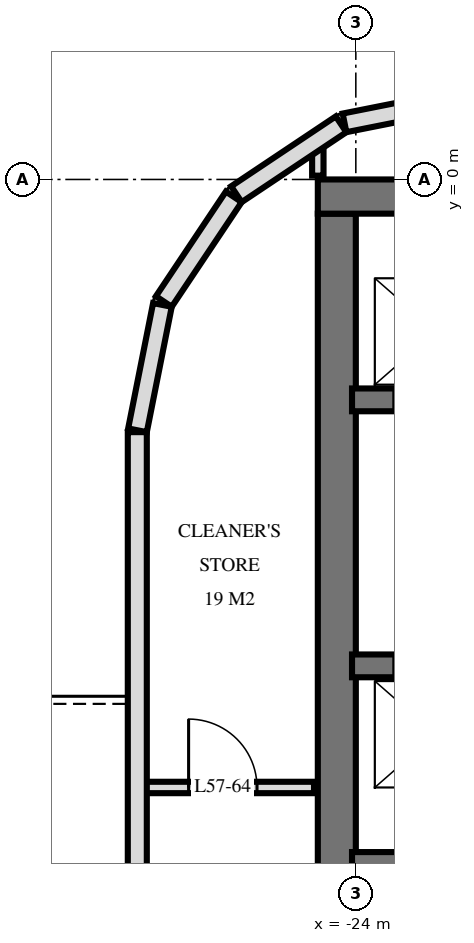
"""IFC4 building model, lengths in metres.
Left out: names, types, materials, properties, quantities, classifications, styles, units other than length and angle.
Written with IfcOpenShell. Run it as: python <this file> out.ifc"""

import sys

from ifc_helpers import new_model, si_unit, direction, frame, frame_2d, origin, place, context, subcontext, project, spatial, rectangle, extrude, element, fill, save


model = new_model("IFC4")
c1 = context("Model", 3, precision=1e-05, world=origin(), true_north=direction((0.0, 1.0)))
c2 = subcontext(c1, "Body", "Model", "MODEL_VIEW")
j1 = project(units=[si_unit("LENGTHUNIT", "METRE"), si_unit("PLANEANGLEUNIT", "RADIAN")], contexts=[c1])
p1 = place(None, origin())
s1 = spatial("IfcSite", under=j1, at=p1, CompositionType="ELEMENT")
p2 = place(p1, origin())
s2 = spatial("IfcBuilding", under=s1, at=p2, CompositionType="ELEMENT")
p3 = place(p2, frame((0.0, 0.0, 218.6)))
s3 = spatial("IfcBuildingStorey", under=s2, at=p3, CompositionType="ELEMENT", Elevation=218.6)
p4 = place(p3, frame((-24.5, -0.225, 0.0), z_axis=(0.0, 0.0, 1.0), x_axis=(1.0, 0.0, 0.0)))
e1 = element("IfcWall", 1, at=p4, inside=s3, PredefinedType="SHEAR", context=c2, shape_type="SweptSolid", body=[
    extrude(rectangle(XDim=14.5, YDim=0.45, at=frame_2d((7.25, 0.0))), origin(), (0.0, 0.0, 1.0), 3.5),
])
p5 = place(p3, frame((-24.25, -14.55, 0.0), z_axis=(0.0, 0.0, 1.0), x_axis=(0.0, 1.0, 0.0)))
e2 = element("IfcWall", 2, at=p5, inside=s3, PredefinedType="SHEAR", context=c2, shape_type="SweptSolid", body=[
    extrude(rectangle(XDim=14.1, YDim=0.5, at=frame_2d((7.05, 0.0))), origin(), (0.0, 0.0, 1.0), 3.5),
])
p6 = place(p3, frame((-24.05, -2.9, 0.0), z_axis=(0.0, 0.0, 1.0), x_axis=(1.0, 0.0, 0.0)))
e3 = element("IfcWall", 3, at=p6, inside=s3, PredefinedType="SHEAR", context=c2, shape_type="SweptSolid", body=[
    extrude(rectangle(XDim=13.7, YDim=0.3, at=frame_2d((6.85, 0.0))), origin(), (0.0, 0.0, 1.0), 3.5),
])
p7 = place(p6, frame((0.55, 0.0, 0.0)))
e4 = element("IfcOpeningElement", 4, at=p7, cuts=e3, PredefinedType="OPENING", context=c2, shape_type="SweptSolid", body=[
    extrude(rectangle(XDim=1.1, YDim=2.1, at=frame_2d((0.55, 1.05))), frame((0.0, 0.16, 0.0), z_axis=(0.0, -1.0, 0.0), x_axis=(1.0, 0.0, 0.0)), (0.0, 0.0, 1.0), 0.32),
])
p8 = place(p6, frame((5.9, 0.0, 0.0)))
e5 = element("IfcOpeningElement", 5, at=p8, cuts=e3, PredefinedType="OPENING", context=c2, shape_type="SweptSolid", body=[
    extrude(rectangle(XDim=0.9, YDim=2.1, at=frame_2d((0.45, 1.05))), frame((0.0, 0.16, 0.0), z_axis=(0.0, -1.0, 0.0), x_axis=(1.0, 0.0, 0.0)), (0.0, 0.0, 1.0), 0.32),
])
p9 = place(p6, frame((11.85, 0.0, 0.0)))
e6 = element("IfcOpeningElement", 6, at=p9, cuts=e3, PredefinedType="OPENING", context=c2, shape_type="SweptSolid", body=[
    extrude(rectangle(XDim=1.0, YDim=2.1, at=frame_2d((0.5, 1.05))), frame((0.0, 0.16, 0.0), z_axis=(0.0, -1.0, 0.0), x_axis=(1.0, 0.0, 0.0)), (0.0, 0.0, 1.0), 0.32),
])
p10 = place(p6, frame((9.312, 0.0, 0.0)))
e7 = element("IfcOpeningElement", 7, at=p10, cuts=e3, PredefinedType="OPENING", context=c2, shape_type="SweptSolid", body=[
    extrude(rectangle(XDim=1.0, YDim=2.1, at=frame_2d((0.5, 1.05))), frame((0.0, 0.16, 0.0), z_axis=(0.0, -1.0, 0.0), x_axis=(1.0, 0.0, 0.0)), (0.0, 0.0, 1.0), 0.32),
])
p11 = place(p6, frame((7.887, 0.0, 0.0)))
e8 = element("IfcOpeningElement", 8, at=p11, cuts=e3, PredefinedType="OPENING", context=c2, shape_type="SweptSolid", body=[
    extrude(rectangle(XDim=1.0, YDim=2.1, at=frame_2d((0.5, 1.05))), frame((0.0, 0.16, 0.0), z_axis=(0.0, -1.0, 0.0), x_axis=(1.0, 0.0, 0.0)), (0.0, 0.0, 1.0), 0.32),
])
p12 = place(p6, frame((3.0, 0.0, 0.0)))
e9 = element("IfcOpeningElement", 9, at=p12, cuts=e3, PredefinedType="OPENING", context=c2, shape_type="SweptSolid", body=[
    extrude(rectangle(XDim=1.0, YDim=2.1, at=frame_2d((0.5, 1.05))), frame((0.0, 0.16, 0.0), z_axis=(0.0, -1.0, 0.0), x_axis=(1.0, 0.0, 0.0)), (0.0, 0.0, 1.0), 0.32),
])
p13 = place(p3, frame((-24.05, -6.4, 0.0), z_axis=(0.0, 0.0, 1.0), x_axis=(1.0, 0.0, 0.0)))
e10 = element("IfcWall", 10, at=p13, inside=s3, PredefinedType="SHEAR", context=c2, shape_type="SweptSolid", body=[
    extrude(rectangle(XDim=13.7, YDim=0.3, at=frame_2d((6.85, 0.0))), origin(), (0.0, 0.0, 1.0), 3.5),
])
p14 = place(p13, frame((0.55, 0.0, 0.0)))
e11 = element("IfcOpeningElement", 11, at=p14, cuts=e10, PredefinedType="OPENING", context=c2, shape_type="SweptSolid", body=[
    extrude(rectangle(XDim=1.1, YDim=2.1, at=frame_2d((0.55, 1.05))), frame((0.0, 0.16, 0.0), z_axis=(0.0, -1.0, 0.0), x_axis=(1.0, 0.0, 0.0)), (0.0, 0.0, 1.0), 0.32),
])
p15 = place(p13, frame((5.8, 0.0, 0.0)))
e12 = element("IfcOpeningElement", 12, at=p15, cuts=e10, PredefinedType="OPENING", context=c2, shape_type="SweptSolid", body=[
    extrude(rectangle(XDim=1.1, YDim=2.1, at=frame_2d((0.55, 1.05))), frame((0.0, 0.16, 0.0), z_axis=(0.0, -1.0, 0.0), x_axis=(1.0, 0.0, 0.0)), (0.0, 0.0, 1.0), 0.32),
])
p16 = place(p3, frame((-24.05, -9.0, 0.0), z_axis=(0.0, 0.0, 1.0), x_axis=(1.0, 0.0, 0.0)))
e13 = element("IfcWall", 13, at=p16, inside=s3, PredefinedType="SHEAR", context=c2, shape_type="SweptSolid", body=[
    extrude(rectangle(XDim=13.7, YDim=0.3, at=frame_2d((6.85, 0.0))), origin(), (0.0, 0.0, 1.0), 3.5),
])
p17 = place(p16, frame((8.8, 0.0, 0.0)))
e14 = element("IfcOpeningElement", 14, at=p17, cuts=e13, PredefinedType="OPENING", context=c2, shape_type="SweptSolid", body=[
    extrude(rectangle(XDim=1.1, YDim=2.1, at=frame_2d((0.55, 1.05))), frame((0.0, 0.16, 0.0), z_axis=(0.0, -1.0, 0.0), x_axis=(1.0, 0.0, 0.0)), (0.0, 0.0, 1.0), 0.32),
])
p18 = place(p3, frame((-22.5, 1.073, 0.0), z_axis=(0.0, 0.0, 1.0), x_axis=(-0.980803419081, -0.194999110559, 0.0)))
e15 = element("IfcWall", 15, at=p18, inside=s3, PredefinedType="SOLIDWALL", context=c2, shape_type="SweptSolid", body=[
    extrude(rectangle(XDim=1.681, YDim=0.25, at=frame_2d((0.841, 0.0))), origin(), (0.0, 0.0, 1.0), 3.22),
])
for number, where, z_axis, x_axis in (
    (16, (-24.194, 0.726, 0.0), (0.0, 0.0, 1.0), (-0.831, -0.556, 0.0)),
    (17, (-25.606, -0.229, 0.0), (0.0, 0.0, 1.0), (-0.556, -0.831, 0.0)),
):
    element("IfcWall", number, at=place(p3, frame(where, z_axis=z_axis, x_axis=x_axis)), inside=s3, PredefinedType="SOLIDWALL", context=c2, shape_type="SweptSolid", body=[
        extrude(rectangle(XDim=1.656, YDim=0.25, at=frame_2d((0.828, 0.0))), origin(), (0.0, 0.0, 1.0), 3.22),
    ])
p19 = place(p3, frame((-26.545, -1.651, 0.0), z_axis=(0.0, 0.0, 1.0), x_axis=(-0.194999110559, -0.980803419081, 0.0)))
e18 = element("IfcWall", 18, at=p19, inside=s3, PredefinedType="SOLIDWALL", context=c2, shape_type="SweptSolid", body=[
    extrude(rectangle(XDim=1.681, YDim=0.25, at=frame_2d((0.841, 0.0))), origin(), (0.0, 0.0, 1.0), 3.22),
])
p20 = place(p3, frame((-26.875, -3.325, 0.0), z_axis=(0.0, 0.0, 1.0), x_axis=(0.0, -1.0, 0.0)))
e19 = element("IfcWall", 19, at=p20, inside=s3, PredefinedType="SOLIDWALL", context=c2, shape_type="SweptSolid", body=[
    extrude(rectangle(XDim=21.551, YDim=0.25, at=frame_2d((10.775, 0.0))), origin(), (0.0, 0.0, 1.0), 3.22),
])
p21 = place(p20, frame((7.275, 0.0, 0.0)))
e20 = element("IfcOpeningElement", 20, at=p21, cuts=e19, PredefinedType="OPENING", context=c2, shape_type="SweptSolid", body=[
    extrude(rectangle(XDim=1.8, YDim=2.4, at=frame_2d((0.9, 1.2))), frame((0.0, 0.135, 0.0), z_axis=(0.0, -1.0, 0.0), x_axis=(1.0, 0.0, 0.0)), (0.0, 0.0, 1.0), 0.27),
])
p22 = place(p20, frame((15.275, 0.0, 0.0)))
e21 = element("IfcOpeningElement", 21, at=p22, cuts=e19, PredefinedType="OPENING", context=c2, shape_type="SweptSolid", body=[
    extrude(rectangle(XDim=1.8, YDim=2.4, at=frame_2d((0.9, 1.2))), frame((0.0, 0.135, 0.0), z_axis=(0.0, -1.0, 0.0), x_axis=(1.0, 0.0, 0.0)), (0.0, 0.0, 1.0), 0.27),
])
p23 = place(p20, frame((18.875, 0.0, 0.0)))
e22 = element("IfcOpeningElement", 22, at=p23, cuts=e19, PredefinedType="OPENING", context=c2, shape_type="SweptSolid", body=[
    extrude(rectangle(XDim=1.8, YDim=2.4, at=frame_2d((0.9, 1.2))), frame((0.0, 0.135, 0.0), z_axis=(0.0, -1.0, 0.0), x_axis=(1.0, 0.0, 0.0)), (0.0, 0.0, 1.0), 0.27),
])
p24 = place(p3, frame((-24.5, 0.05, 0.0), z_axis=(0.0, 0.0, 1.0), x_axis=(0.0, 1.0, 0.0)))
e23 = element("IfcWall", 23, at=p24, inside=s3, PredefinedType="PARTITIONING", context=c2, shape_type="SweptSolid", body=[
    extrude(rectangle(XDim=0.405, YDim=0.15, at=frame_2d((0.203, 0.0))), origin(), (0.0, 0.0, 1.0), 3.22),
])
p25 = place(p3, frame((-26.82, -8.0, 0.0), z_axis=(0.0, 0.0, 1.0), x_axis=(1.0, 0.0, 0.0)))
e24 = element("IfcWall", 24, at=p25, inside=s3, PredefinedType="PLUMBINGWALL", context=c2, shape_type="SweptSolid", body=[
    extrude(rectangle(XDim=2.27, YDim=0.15, at=frame_2d((1.135, 0.0))), origin(), (0.0, 0.0, 1.0), 3.22),
])
p26 = place(p25, frame((0.62, 0.0, 0.0)))
e25 = element("IfcOpeningElement", 25, at=p26, cuts=e24, PredefinedType="OPENING", context=c2, shape_type="SweptSolid", body=[
    extrude(rectangle(XDim=0.9, YDim=2.1, at=frame_2d((0.45, 1.05))), frame((0.0, 0.085, 0.0), z_axis=(0.0, -1.0, 0.0), x_axis=(1.0, 0.0, 0.0)), (0.0, 0.0, 1.0), 0.17),
])
p27 = place(p26, origin())
e26 = element("IfcDoor", 26, at=p27, inside=s3, OperationType="SINGLE_SWING_RIGHT", PredefinedType="DOOR", context=c2, shape_type="SweptSolid", body=[
    extrude(rectangle(XDim=0.9, YDim=2.1, at=frame_2d((0.45, 1.05))), frame((0.0, 0.025, 0.0), z_axis=(0.0, -1.0, 0.0), x_axis=(1.0, 0.0, 0.0)), (0.0, 0.0, 1.0), 0.05),
])
fill(e25, e26)
save(model, sys.argv[1])
